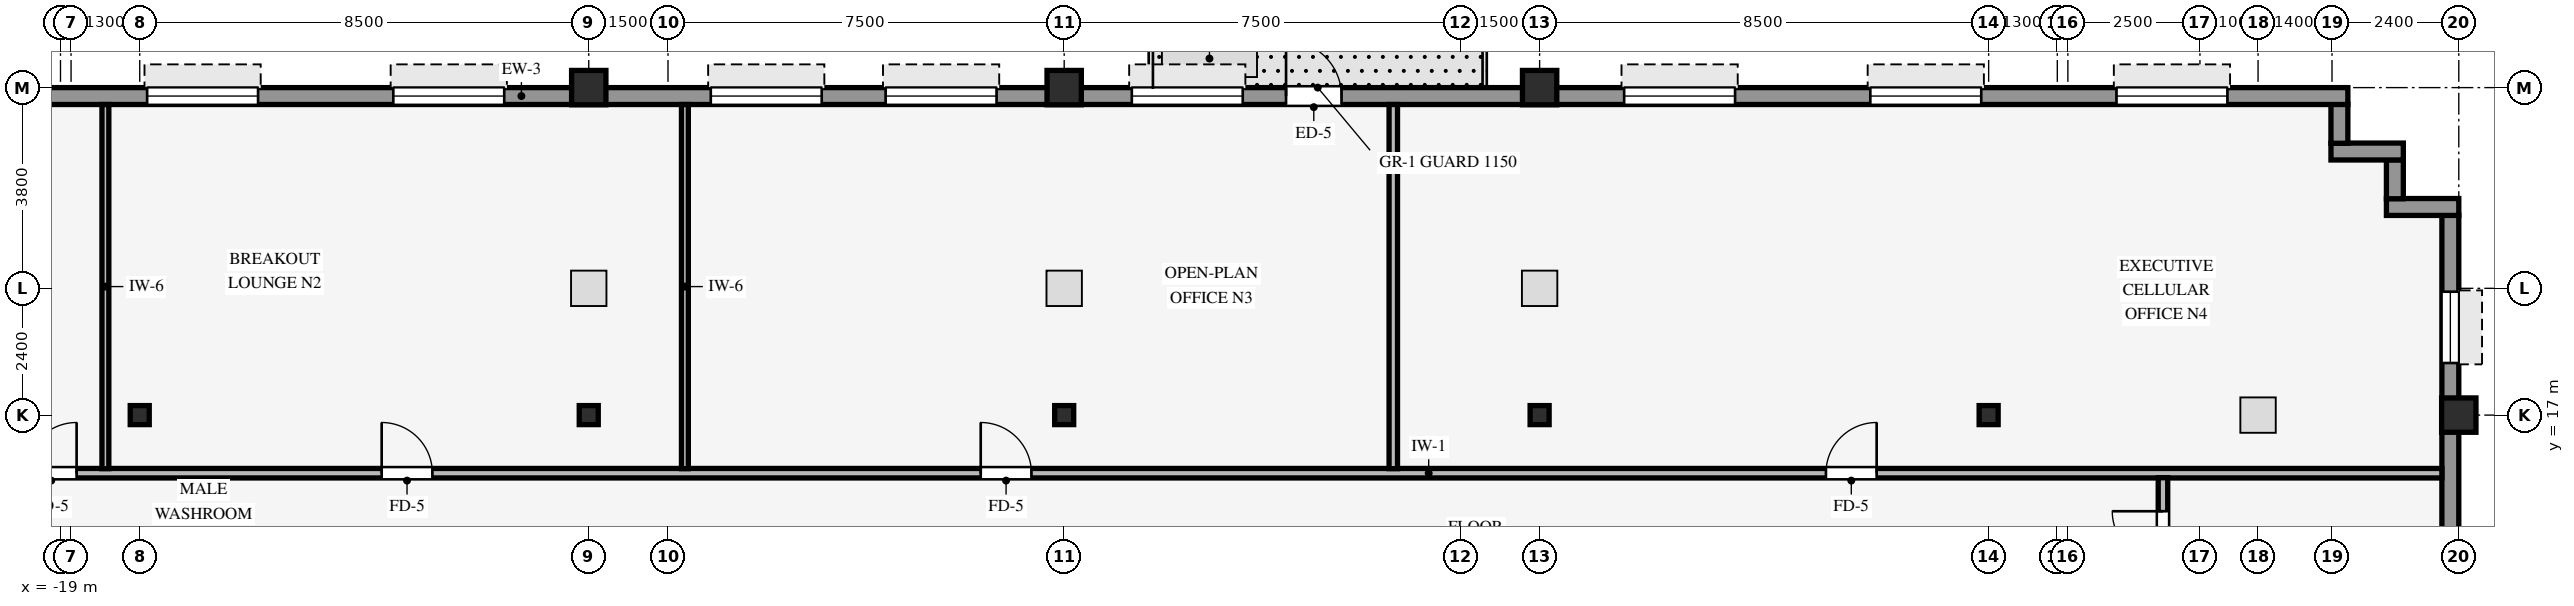
"""IFC4 building model, lengths in metres.
Left out: names, types, materials, properties, quantities, classifications, styles, units other than length and angle.
Written with IfcOpenShell. Run it as: python <this file> out.ifc"""

import sys

from ifc_helpers import new_model, si_unit, direction, frame, frame_2d, origin, origin_2d, place, context, subcontext, project, spatial, rectangle, hollow_rectangle, i_section, extrude, source, transform, mapped, element, fill, save


model = new_model("IFC4")
c1 = context("Model", 3, precision=1e-05, world=origin(), true_north=direction((0.0, 1.0)))
c2 = subcontext(c1, "Body", "Model", "MODEL_VIEW")
j1 = project(units=[si_unit("LENGTHUNIT", "METRE"), si_unit("PLANEANGLEUNIT", "RADIAN")], contexts=[c1])
p1 = place(None, origin())
s1 = spatial("IfcSite", under=j1, at=p1, CompositionType="ELEMENT")
p2 = place(p1, origin())
s2 = spatial("IfcBuilding", under=s1, at=p2, CompositionType="ELEMENT")
p3 = place(p2, frame((0.0, 0.0, 164.0)))
s3 = spatial("IfcBuildingStorey", under=s2, at=p3, CompositionType="ELEMENT", Elevation=164.0)
for number, where, z_axis, x_axis in (
    (1, (26.4, 17.0, 0.0), (0.0, 0.0, 1.0), (1.0, 0.0, 0.0)),
    (2, (-9.0, 23.2, 0.0), (0.0, 0.0, 1.0), (1.0, 0.0, 0.0)),
    (3, (0.0, 23.2, 0.0), (0.0, 0.0, 1.0), (1.0, 0.0, 0.0)),
    (4, (9.0, 23.2, 0.0), (0.0, 0.0, 1.0), (1.0, 0.0, 0.0)),
):
    element("IfcColumn", number, at=place(p3, frame(where, z_axis=z_axis, x_axis=x_axis)), inside=s3, PredefinedType="COLUMN", context=c2, shape_type="SweptSolid", body=[
        extrude(hollow_rectangle(XDim=0.65, YDim=0.65, WallThickness=0.04, InnerFilletRadius=0.04, OuterFilletRadius=0.08, at=origin_2d()), origin(), (0.0, 0.0, 1.0), 3.25),
    ])
for number, where, z_axis, x_axis in (
    (5, (0.0, 17.0, 0.0), (0.0, 0.0, 1.0), (1.0, 0.0, 0.0)),
    (6, (-17.5, 17.0, 0.0), (0.0, 0.0, 1.0), (1.0, 0.0, 0.0)),
    (7, (-9.0, 17.0, 0.0), (0.0, 0.0, 1.0), (1.0, 0.0, 0.0)),
    (8, (9.0, 17.0, 0.0), (0.0, 0.0, 1.0), (1.0, 0.0, 0.0)),
    (9, (17.5, 17.0, 0.0), (0.0, 0.0, 1.0), (1.0, 0.0, 0.0)),
):
    element("IfcColumn", number, at=place(p3, frame(where, z_axis=z_axis, x_axis=x_axis)), inside=s3, PredefinedType="COLUMN", context=c2, shape_type="SweptSolid", body=[
        extrude(i_section(OverallWidth=0.36, OverallDepth=0.36, WebThickness=0.021, FlangeThickness=0.021, FilletRadius=0.018, at=origin_2d()), origin(), (0.0, 0.0, 1.0), 3.25),
    ])
p4 = place(p3, frame((26.24, -20.784, 0.0), z_axis=(0.0, 0.0, 1.0), x_axis=(0.0, 1.0, 0.0)))
e10 = element("IfcWall", 10, at=p4, inside=s3, PredefinedType="STANDARD", context=c2, shape_type="SweptSolid", body=[
    extrude(rectangle(XDim=41.568, YDim=0.32, at=frame_2d((20.784, 0.0))), origin(), (0.0, 0.0, 1.0), 3.24),
])
p5 = place(p4, frame((1.448, 0.0, 0.8)))
e11 = element("IfcOpeningElement", 11, at=p5, cuts=e10, PredefinedType="OPENING", context=c2, shape_type="SweptSolid", body=[
    extrude(rectangle(XDim=1.35, YDim=1.56, at=frame_2d((0.675, 0.78))), frame((0.0, 0.17, 0.0), z_axis=(0.0, -1.0, 0.0), x_axis=(1.0, 0.0, 0.0)), (0.0, 0.0, 1.0), 0.34),
])
p6 = place(p4, frame((7.744, 0.0, 0.8)))
e12 = element("IfcOpeningElement", 12, at=p6, cuts=e10, PredefinedType="OPENING", context=c2, shape_type="SweptSolid", body=[
    extrude(rectangle(XDim=1.35, YDim=1.56, at=frame_2d((0.675, 0.78))), frame((0.0, 0.17, 0.0), z_axis=(0.0, -1.0, 0.0), x_axis=(1.0, 0.0, 0.0)), (0.0, 0.0, 1.0), 0.34),
])
p7 = place(p4, frame((12.69, 0.0, 0.8)))
e13 = element("IfcOpeningElement", 13, at=p7, cuts=e10, PredefinedType="OPENING", context=c2, shape_type="SweptSolid", body=[
    extrude(rectangle(XDim=1.35, YDim=1.56, at=frame_2d((0.675, 0.78))), frame((0.0, 0.17, 0.0), z_axis=(0.0, -1.0, 0.0), x_axis=(1.0, 0.0, 0.0)), (0.0, 0.0, 1.0), 0.34),
])
p8 = place(p4, frame((17.636, 0.0, 0.8)))
e14 = element("IfcOpeningElement", 14, at=p8, cuts=e10, PredefinedType="OPENING", context=c2, shape_type="SweptSolid", body=[
    extrude(rectangle(XDim=1.35, YDim=1.56, at=frame_2d((0.675, 0.78))), frame((0.0, 0.17, 0.0), z_axis=(0.0, -1.0, 0.0), x_axis=(1.0, 0.0, 0.0)), (0.0, 0.0, 1.0), 0.34),
])
p9 = place(p4, frame((22.582, 0.0, 0.8)))
e15 = element("IfcOpeningElement", 15, at=p9, cuts=e10, PredefinedType="OPENING", context=c2, shape_type="SweptSolid", body=[
    extrude(rectangle(XDim=1.35, YDim=1.56, at=frame_2d((0.675, 0.78))), frame((0.0, 0.17, 0.0), z_axis=(0.0, -1.0, 0.0), x_axis=(1.0, 0.0, 0.0)), (0.0, 0.0, 1.0), 0.34),
])
p10 = place(p4, frame((27.528, 0.0, 0.8)))
e16 = element("IfcOpeningElement", 16, at=p10, cuts=e10, PredefinedType="OPENING", context=c2, shape_type="SweptSolid", body=[
    extrude(rectangle(XDim=1.35, YDim=1.56, at=frame_2d((0.675, 0.78))), frame((0.0, 0.17, 0.0), z_axis=(0.0, -1.0, 0.0), x_axis=(1.0, 0.0, 0.0)), (0.0, 0.0, 1.0), 0.34),
])
p11 = place(p4, frame((32.474, 0.0, 0.8)))
e17 = element("IfcOpeningElement", 17, at=p11, cuts=e10, PredefinedType="OPENING", context=c2, shape_type="SweptSolid", body=[
    extrude(rectangle(XDim=1.35, YDim=1.56, at=frame_2d((0.675, 0.78))), frame((0.0, 0.17, 0.0), z_axis=(0.0, -1.0, 0.0), x_axis=(1.0, 0.0, 0.0)), (0.0, 0.0, 1.0), 0.34),
])
p12 = place(p4, frame((38.77, 0.0, 0.8)))
e18 = element("IfcOpeningElement", 18, at=p12, cuts=e10, PredefinedType="OPENING", context=c2, shape_type="SweptSolid", body=[
    extrude(rectangle(XDim=1.35, YDim=1.56, at=frame_2d((0.675, 0.78))), frame((0.0, 0.17, 0.0), z_axis=(0.0, -1.0, 0.0), x_axis=(1.0, 0.0, 0.0)), (0.0, 0.0, 1.0), 0.34),
])
p13 = place(p3, frame((25.03, 20.94, 0.0), z_axis=(0.0, 0.0, 1.0), x_axis=(1.0, 0.0, 0.0)))
e19 = element("IfcWall", 19, at=p13, inside=s3, PredefinedType="STANDARD", context=c2, shape_type="SweptSolid", body=[
    extrude(rectangle(XDim=1.37, YDim=0.32, at=frame_2d((0.685, 0.0))), origin(), (0.0, 0.0, 1.0), 3.24),
])
p14 = place(p3, frame((25.19, 21.096, 0.0), z_axis=(0.0, 0.0, 1.0), x_axis=(0.0, 1.0, 0.0)))
e20 = element("IfcWall", 20, at=p14, inside=s3, PredefinedType="STANDARD", context=c2, shape_type="SweptSolid", body=[
    extrude(rectangle(XDim=0.738, YDim=0.32, at=frame_2d((0.369, 0.0))), origin(), (0.0, 0.0, 1.0), 3.24),
])
p15 = place(p3, frame((23.98, 21.99, 0.0), z_axis=(0.0, 0.0, 1.0), x_axis=(1.0, 0.0, 0.0)))
e21 = element("IfcWall", 21, at=p15, inside=s3, PredefinedType="STANDARD", context=c2, shape_type="SweptSolid", body=[
    extrude(rectangle(XDim=1.37, YDim=0.32, at=frame_2d((0.685, 0.0))), origin(), (0.0, 0.0, 1.0), 3.24),
])
p16 = place(p3, frame((24.14, 22.146, 0.0), z_axis=(0.0, 0.0, 1.0), x_axis=(0.0, 1.0, 0.0)))
e22 = element("IfcWall", 22, at=p16, inside=s3, PredefinedType="STANDARD", context=c2, shape_type="SweptSolid", body=[
    extrude(rectangle(XDim=0.738, YDim=0.32, at=frame_2d((0.369, 0.0))), origin(), (0.0, 0.0, 1.0), 3.24),
])
p17 = place(p3, frame((-24.3, 23.04, 0.0), z_axis=(0.0, 0.0, 1.0), x_axis=(1.0, 0.0, 0.0)))
e23 = element("IfcWall", 23, at=p17, inside=s3, PredefinedType="STANDARD", context=c2, shape_type="SweptSolid", body=[
    extrude(rectangle(XDim=48.6, YDim=0.32, at=frame_2d((24.3, 0.0))), origin(), (0.0, 0.0, 1.0), 2.792),
])
p18 = place(p17, frame((28.5, 0.0, 0.0)))
e24 = element("IfcOpeningElement", 24, at=p18, cuts=e23, PredefinedType="OPENING", context=c2, shape_type="SweptSolid", body=[
    extrude(rectangle(XDim=1.05, YDim=2.1, at=frame_2d((0.525, 1.05))), frame((0.0, 0.17, 0.0), z_axis=(0.0, -1.0, 0.0), x_axis=(1.0, 0.0, 0.0)), (0.0, 0.0, 1.0), 0.34),
])
p19 = place(p17, frame((2.28, 0.0, 0.8)))
e25 = element("IfcOpeningElement", 25, at=p19, cuts=e23, PredefinedType="OPENING", context=c2, shape_type="SweptSolid", body=[
    extrude(rectangle(XDim=2.1, YDim=1.56, at=frame_2d((1.05, 0.78))), frame((0.0, 0.17, 0.0), z_axis=(0.0, -1.0, 0.0), x_axis=(1.0, 0.0, 0.0)), (0.0, 0.0, 1.0), 0.34),
])
p20 = place(p17, frame((6.94, 0.0, 0.8)))
e26 = element("IfcOpeningElement", 26, at=p20, cuts=e23, PredefinedType="OPENING", context=c2, shape_type="SweptSolid", body=[
    extrude(rectangle(XDim=2.1, YDim=1.56, at=frame_2d((1.05, 0.78))), frame((0.0, 0.17, 0.0), z_axis=(0.0, -1.0, 0.0), x_axis=(1.0, 0.0, 0.0)), (0.0, 0.0, 1.0), 0.34),
])
p21 = place(p17, frame((11.6, 0.0, 0.8)))
e27 = element("IfcOpeningElement", 27, at=p21, cuts=e23, PredefinedType="OPENING", context=c2, shape_type="SweptSolid", body=[
    extrude(rectangle(XDim=2.1, YDim=1.56, at=frame_2d((1.05, 0.78))), frame((0.0, 0.17, 0.0), z_axis=(0.0, -1.0, 0.0), x_axis=(1.0, 0.0, 0.0)), (0.0, 0.0, 1.0), 0.34),
])
p22 = place(p17, frame((17.61, 0.0, 0.8)))
e28 = element("IfcOpeningElement", 28, at=p22, cuts=e23, PredefinedType="OPENING", context=c2, shape_type="SweptSolid", body=[
    extrude(rectangle(XDim=2.1, YDim=1.56, at=frame_2d((1.05, 0.78))), frame((0.0, 0.17, 0.0), z_axis=(0.0, -1.0, 0.0), x_axis=(1.0, 0.0, 0.0)), (0.0, 0.0, 1.0), 0.34),
])
p23 = place(p17, frame((20.92, 0.0, 0.8)))
e29 = element("IfcOpeningElement", 29, at=p23, cuts=e23, PredefinedType="OPENING", context=c2, shape_type="SweptSolid", body=[
    extrude(rectangle(XDim=2.1, YDim=1.56, at=frame_2d((1.05, 0.78))), frame((0.0, 0.17, 0.0), z_axis=(0.0, -1.0, 0.0), x_axis=(1.0, 0.0, 0.0)), (0.0, 0.0, 1.0), 0.34),
])
p24 = place(p17, frame((25.58, 0.0, 0.8)))
e30 = element("IfcOpeningElement", 30, at=p24, cuts=e23, PredefinedType="OPENING", context=c2, shape_type="SweptSolid", body=[
    extrude(rectangle(XDim=2.1, YDim=1.56, at=frame_2d((1.05, 0.78))), frame((0.0, 0.17, 0.0), z_axis=(0.0, -1.0, 0.0), x_axis=(1.0, 0.0, 0.0)), (0.0, 0.0, 1.0), 0.34),
])
p25 = place(p17, frame((34.9, 0.0, 0.8)))
e31 = element("IfcOpeningElement", 31, at=p25, cuts=e23, PredefinedType="OPENING", context=c2, shape_type="SweptSolid", body=[
    extrude(rectangle(XDim=2.1, YDim=1.56, at=frame_2d((1.05, 0.78))), frame((0.0, 0.17, 0.0), z_axis=(0.0, -1.0, 0.0), x_axis=(1.0, 0.0, 0.0)), (0.0, 0.0, 1.0), 0.34),
])
p26 = place(p17, frame((39.56, 0.0, 0.8)))
e32 = element("IfcOpeningElement", 32, at=p26, cuts=e23, PredefinedType="OPENING", context=c2, shape_type="SweptSolid", body=[
    extrude(rectangle(XDim=2.1, YDim=1.56, at=frame_2d((1.05, 0.78))), frame((0.0, 0.17, 0.0), z_axis=(0.0, -1.0, 0.0), x_axis=(1.0, 0.0, 0.0)), (0.0, 0.0, 1.0), 0.34),
])
p27 = place(p17, frame((44.22, 0.0, 0.8)))
e33 = element("IfcOpeningElement", 33, at=p27, cuts=e23, PredefinedType="OPENING", context=c2, shape_type="SweptSolid", body=[
    extrude(rectangle(XDim=2.1, YDim=1.56, at=frame_2d((1.05, 0.78))), frame((0.0, 0.17, 0.0), z_axis=(0.0, -1.0, 0.0), x_axis=(1.0, 0.0, 0.0)), (0.0, 0.0, 1.0), 0.34),
])
p28 = place(p3, frame((-26.08, 15.9, 0.0), z_axis=(0.0, 0.0, 1.0), x_axis=(1.0, 0.0, 0.0)))
e34 = element("IfcWall", 34, at=p28, inside=s3, PredefinedType="PARTITIONING", context=c2, shape_type="SweptSolid", body=[
    extrude(rectangle(XDim=52.16, YDim=0.18, at=frame_2d((26.08, 0.0))), origin(), (0.0, 0.0, 1.0), 3.24),
])
p29 = place(p28, frame((24.5, 0.0, 0.0)))
e35 = element("IfcOpeningElement", 35, at=p29, cuts=e34, PredefinedType="OPENING", context=c2, shape_type="SweptSolid", body=[
    extrude(rectangle(XDim=0.96, YDim=2.1, at=frame_2d((0.48, 1.05))), frame((0.0, 0.1, 0.0), z_axis=(0.0, -1.0, 0.0), x_axis=(1.0, 0.0, 0.0)), (0.0, 0.0, 1.0), 0.2),
])
p30 = place(p28, frame((40.5, 0.0, 0.0)))
e36 = element("IfcOpeningElement", 36, at=p30, cuts=e34, PredefinedType="OPENING", context=c2, shape_type="SweptSolid", body=[
    extrude(rectangle(XDim=0.96, YDim=2.1, at=frame_2d((0.48, 1.05))), frame((0.0, 0.1, 0.0), z_axis=(0.0, -1.0, 0.0), x_axis=(1.0, 0.0, 0.0)), (0.0, 0.0, 1.0), 0.2),
])
p31 = place(p28, frame((13.16, 0.0, 0.0)))
e37 = element("IfcOpeningElement", 37, at=p31, cuts=e34, PredefinedType="OPENING", context=c2, shape_type="SweptSolid", body=[
    extrude(rectangle(XDim=0.96, YDim=2.1, at=frame_2d((0.48, 1.05))), frame((0.0, 0.1, 0.0), z_axis=(0.0, -1.0, 0.0), x_axis=(1.0, 0.0, 0.0)), (0.0, 0.0, 1.0), 0.2),
])
p32 = place(p28, frame((6.425, 0.0, 0.0)))
e38 = element("IfcOpeningElement", 38, at=p32, cuts=e34, PredefinedType="OPENING", context=c2, shape_type="SweptSolid", body=[
    extrude(rectangle(XDim=0.96, YDim=2.1, at=frame_2d((0.48, 1.05))), frame((0.0, 0.1, 0.0), z_axis=(0.0, -1.0, 0.0), x_axis=(1.0, 0.0, 0.0)), (0.0, 0.0, 1.0), 0.2),
])
for number, where, z_axis, x_axis in (
    (39, (-18.15, 15.986, 0.0), (0.0, 0.0, 1.0), (0.0, 1.0, 0.0)),
    (40, (-7.18, 15.986, 0.0), (0.0, 0.0, 1.0), (0.0, 1.0, 0.0)),
):
    element("IfcWall", number, at=place(p3, frame(where, z_axis=z_axis, x_axis=x_axis)), inside=s3, PredefinedType="PARTITIONING", context=c2, shape_type="SweptSolid", body=[
        extrude(rectangle(XDim=6.894, YDim=0.13, at=frame_2d((3.447, 0.0))), origin(), (0.0, 0.0, 1.0), 3.24),
    ])
p33 = place(p3, frame((6.23, 15.986, 0.0), z_axis=(0.0, 0.0, 1.0), x_axis=(0.0, 1.0, 0.0)))
e41 = element("IfcWall", 41, at=p33, inside=s3, PredefinedType="PARTITIONING", context=c2, shape_type="SweptSolid", body=[
    extrude(rectangle(XDim=6.894, YDim=0.16, at=frame_2d((3.447, 0.0))), origin(), (0.0, 0.0, 1.0), 3.24),
])
p34 = place(p3, frame((20.8, 13.586, 0.0), z_axis=(0.0, 0.0, 1.0), x_axis=(0.0, 1.0, 0.0)))
e42 = element("IfcWall", 42, at=p34, inside=s3, PredefinedType="PARTITIONING", context=c2, shape_type="SweptSolid", body=[
    extrude(rectangle(XDim=2.228, YDim=0.18, at=frame_2d((1.114, 0.0))), origin(), (0.0, 0.0, 1.0), 3.24),
])
p35 = place(p34, frame((0.634, 0.0, 0.0)))
e43 = element("IfcOpeningElement", 43, at=p35, cuts=e42, PredefinedType="OPENING", context=c2, shape_type="SweptSolid", body=[
    extrude(rectangle(XDim=0.96, YDim=2.1, at=frame_2d((0.48, 1.05))), frame((0.0, 0.1, 0.0), z_axis=(0.0, -1.0, 0.0), x_axis=(1.0, 0.0, 0.0)), (0.0, 0.0, 1.0), 0.2),
])
m1 = source(origin(), c2, "Body", "SweptSolid", [
    extrude(rectangle(XDim=1.35, YDim=1.56, at=frame_2d((0.675, 0.78))), frame((0.0, 0.03, 0.0), z_axis=(0.0, -1.0, 0.0), x_axis=(1.0, 0.0, 0.0)), (0.0, 0.0, 1.0), 0.06),
])
p36 = place(p12, origin())
e44 = element("IfcWindow", 44, at=p36, inside=s3, PartitioningType="SINGLE_PANEL", PredefinedType="WINDOW", context=c2, shape_type="MappedRepresentation", body=[
    mapped(m1, transform((0.0, 0.0, 0.0), scale=1.0)),
])
fill(e18, e44)
m2 = source(origin(), c2, "Body", "SweptSolid", [
    extrude(rectangle(XDim=1.05, YDim=2.1, at=frame_2d((0.525, 1.05))), frame((0.0, 0.025, 0.0), z_axis=(0.0, -1.0, 0.0), x_axis=(1.0, 0.0, 0.0)), (0.0, 0.0, 1.0), 0.05),
])
p37 = place(p18, origin())
e45 = element("IfcDoor", 45, at=p37, inside=s3, OperationType="SINGLE_SWING_LEFT", PredefinedType="DOOR", context=c2, shape_type="MappedRepresentation", body=[
    mapped(m2, transform((0.0, 0.0, 0.0), scale=1.0)),
])
fill(e24, e45)
m3 = source(origin(), c2, "Body", "SweptSolid", [
    extrude(rectangle(XDim=2.1, YDim=1.56, at=frame_2d((1.05, 0.78))), frame((0.0, 0.03, 0.0), z_axis=(0.0, -1.0, 0.0), x_axis=(1.0, 0.0, 0.0)), (0.0, 0.0, 1.0), 0.06),
])
p38 = place(p20, origin())
e46 = element("IfcWindow", 46, at=p38, inside=s3, PartitioningType="SINGLE_PANEL", PredefinedType="WINDOW", context=c2, shape_type="MappedRepresentation", body=[
    mapped(m3, transform((0.0, 0.0, 0.0), scale=1.0)),
])
fill(e26, e46)
p39 = place(p21, origin())
e47 = element("IfcWindow", 47, at=p39, inside=s3, PartitioningType="SINGLE_PANEL", PredefinedType="WINDOW", context=c2, shape_type="MappedRepresentation", body=[
    mapped(m3, transform((0.0, 0.0, 0.0), scale=1.0)),
])
fill(e27, e47)
p40 = place(p22, origin())
e48 = element("IfcWindow", 48, at=p40, inside=s3, PartitioningType="SINGLE_PANEL", PredefinedType="WINDOW", context=c2, shape_type="MappedRepresentation", body=[
    mapped(m3, transform((0.0, 0.0, 0.0), scale=1.0)),
])
fill(e28, e48)
p41 = place(p23, origin())
e49 = element("IfcWindow", 49, at=p41, inside=s3, PartitioningType="SINGLE_PANEL", PredefinedType="WINDOW", context=c2, shape_type="MappedRepresentation", body=[
    mapped(m3, transform((0.0, 0.0, 0.0), scale=1.0)),
])
fill(e29, e49)
p42 = place(p24, origin())
e50 = element("IfcWindow", 50, at=p42, inside=s3, PartitioningType="SINGLE_PANEL", PredefinedType="WINDOW", context=c2, shape_type="MappedRepresentation", body=[
    mapped(m3, transform((0.0, 0.0, 0.0), scale=1.0)),
])
fill(e30, e50)
p43 = place(p25, origin())
e51 = element("IfcWindow", 51, at=p43, inside=s3, PartitioningType="SINGLE_PANEL", PredefinedType="WINDOW", context=c2, shape_type="MappedRepresentation", body=[
    mapped(m3, transform((0.0, 0.0, 0.0), scale=1.0)),
])
fill(e31, e51)
p44 = place(p26, origin())
e52 = element("IfcWindow", 52, at=p44, inside=s3, PartitioningType="SINGLE_PANEL", PredefinedType="WINDOW", context=c2, shape_type="MappedRepresentation", body=[
    mapped(m3, transform((0.0, 0.0, 0.0), scale=1.0)),
])
fill(e32, e52)
p45 = place(p27, origin())
e53 = element("IfcWindow", 53, at=p45, inside=s3, PartitioningType="SINGLE_PANEL", PredefinedType="WINDOW", context=c2, shape_type="MappedRepresentation", body=[
    mapped(m3, transform((0.0, 0.0, 0.0), scale=1.0)),
])
fill(e33, e53)
m4 = source(origin(), c2, "Body", "SweptSolid", [
    extrude(rectangle(XDim=0.96, YDim=2.1, at=frame_2d((0.48, 1.05))), frame((0.0, 0.025, 0.0), z_axis=(0.0, -1.0, 0.0), x_axis=(1.0, 0.0, 0.0)), (0.0, 0.0, 1.0), 0.05),
])
p46 = place(p29, origin())
e54 = element("IfcDoor", 54, at=p46, inside=s3, OperationType="SINGLE_SWING_LEFT", PredefinedType="DOOR", context=c2, shape_type="MappedRepresentation", body=[
    mapped(m4, transform((0.0, 0.0, 0.0), scale=1.0)),
])
fill(e35, e54)
p47 = place(p30, origin())
e55 = element("IfcDoor", 55, at=p47, inside=s3, OperationType="SINGLE_SWING_RIGHT", PredefinedType="DOOR", context=c2, shape_type="MappedRepresentation", body=[
    mapped(m4, transform((0.0, 0.0, 0.0), scale=1.0)),
])
fill(e36, e55)
p48 = place(p31, origin())
e56 = element("IfcDoor", 56, at=p48, inside=s3, OperationType="SINGLE_SWING_LEFT", PredefinedType="DOOR", context=c2, shape_type="MappedRepresentation", body=[
    mapped(m4, transform((0.0, 0.0, 0.0), scale=1.0)),
])
fill(e37, e56)
p49 = place(p35, origin())
e57 = element("IfcDoor", 57, at=p49, inside=s3, OperationType="SINGLE_SWING_RIGHT", PredefinedType="DOOR", context=c2, shape_type="MappedRepresentation", body=[
    mapped(m4, transform((0.0, 0.0, 0.0), scale=1.0)),
])
fill(e43, e57)
p50 = place(p32, origin())
e58 = element("IfcDoor", 58, at=p50, inside=s3, OperationType="SINGLE_SWING_RIGHT", PredefinedType="DOOR", context=c2, shape_type="MappedRepresentation", body=[
    mapped(m4, transform((0.0, 0.0, 0.0), scale=1.0)),
])
fill(e38, e58)
save(model, sys.argv[1])
